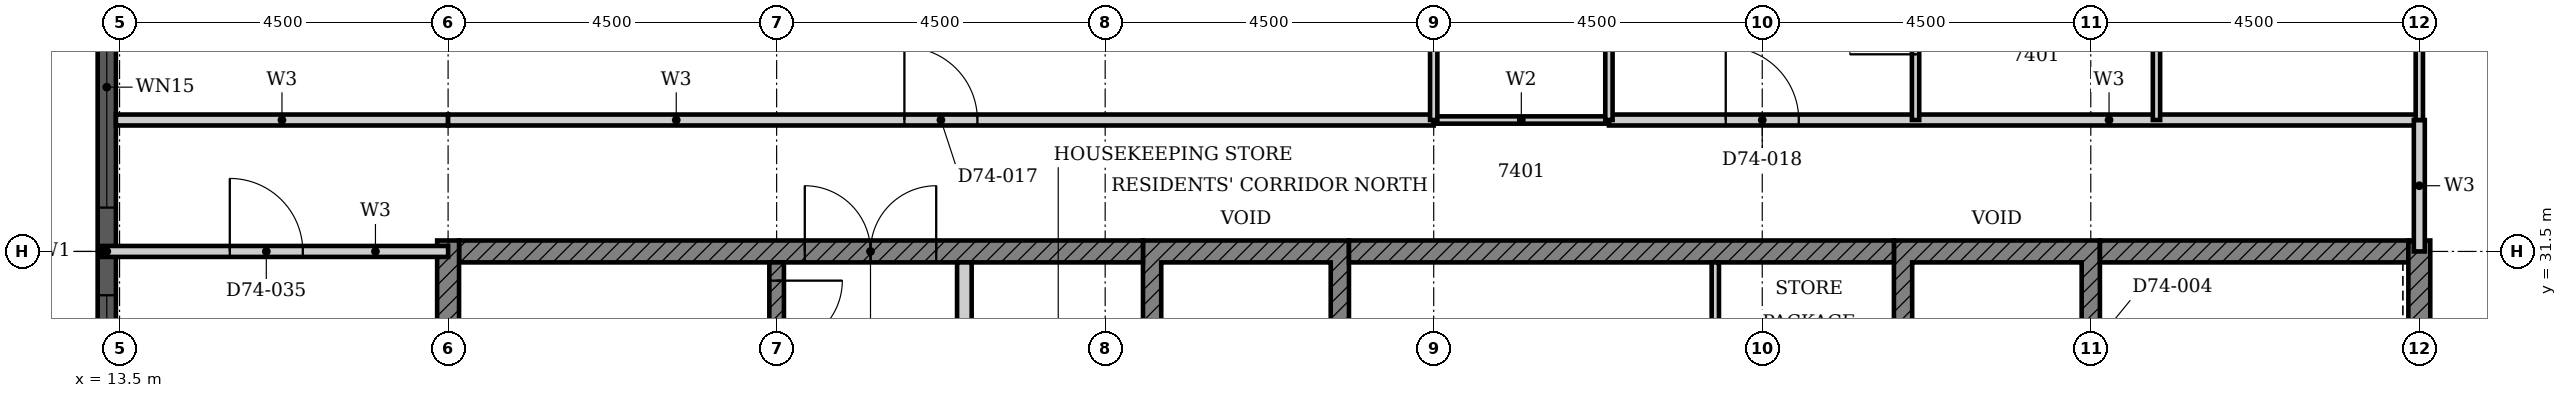
"""IFC4 building model, lengths in metres.
Left out: names, types, materials, properties, quantities, classifications, styles, units other than length and angle.
Written with IfcOpenShell. Run it as: python <this file> out.ifc"""

import sys

from ifc_helpers import new_model, si_unit, direction, frame, frame_2d, origin, place, context, subcontext, project, spatial, polyline, rectangle, outline, extrude, element, fill, save


model = new_model("IFC4")
c1 = context("Model", 3, precision=1e-05, world=origin(), true_north=direction((0.0, 1.0)))
c2 = subcontext(c1, "Body", "Model", "MODEL_VIEW")
j1 = project(units=[si_unit("LENGTHUNIT", "METRE"), si_unit("PLANEANGLEUNIT", "RADIAN")], contexts=[c1])
p1 = place(None, origin())
s1 = spatial("IfcSite", under=j1, at=p1, CompositionType="ELEMENT")
p2 = place(p1, origin())
s2 = spatial("IfcBuilding", under=s1, at=p2, CompositionType="ELEMENT")
p3 = place(p2, frame((0.0, 0.0, 290.8)))
s3 = spatial("IfcBuildingStorey", under=s2, at=p3, CompositionType="ELEMENT", Elevation=290.8)
p4 = place(p3, frame((13.325, 35.7, 0.0), z_axis=(0.0, 0.0, 1.0), x_axis=(0.0, -1.0, 0.0)))
e1 = element("IfcWall", 1, at=p4, inside=s3, PredefinedType="SOLIDWALL", context=c2, shape_type="SweptSolid", body=[
    extrude(rectangle(XDim=8.4, YDim=0.25, at=frame_2d((4.2, 0.0))), origin(), (0.0, 0.0, 1.0), 3.7),
])
p5 = place(p4, frame((0.3, 0.0, 0.45)))
e2 = element("IfcOpeningElement", 2, at=p5, cuts=e1, PredefinedType="OPENING", context=c2, shape_type="SweptSolid", body=[
    extrude(rectangle(XDim=3.3, YDim=2.3, at=frame_2d((1.65, 1.15))), frame((0.0, 0.135, 0.0), z_axis=(0.0, -1.0, 0.0), x_axis=(1.0, 0.0, 0.0)), (0.0, 0.0, 1.0), 0.27),
])
p6 = place(p4, frame((4.8, 0.0, 0.45)))
e3 = element("IfcOpeningElement", 3, at=p6, cuts=e1, PredefinedType="OPENING", context=c2, shape_type="SweptSolid", body=[
    extrude(rectangle(XDim=3.3, YDim=2.3, at=frame_2d((1.65, 1.15))), frame((0.0, 0.135, 0.0), z_axis=(0.0, -1.0, 0.0), x_axis=(1.0, 0.0, 0.0)), (0.0, 0.0, 1.0), 0.27),
])
p7 = place(p3, origin())
e4 = element("IfcWall", 4, at=p7, inside=s3, PredefinedType="SHEAR", context=c2, shape_type="SweptSolid", body=[
    extrude(outline(polyline([(27.518, 28.725), (27.768, 28.725), (27.768, 31.35), (30.089, 31.35), (30.089, 28.725), (30.339, 28.725), (30.339, 31.65), (27.518, 31.65), (27.518, 28.725)])), origin(), (0.0, 0.0, 1.0), 3.4),
])
p8 = place(p3, origin())
e5 = element("IfcWall", 5, at=p8, inside=s3, PredefinedType="SHEAR", context=c2, shape_type="SweptSolid", body=[
    extrude(outline(polyline([(37.803, 28.725), (38.053, 28.725), (38.053, 31.35), (40.375, 31.35), (40.375, 28.725), (40.625, 28.725), (40.625, 31.65), (37.803, 31.65), (37.803, 28.725)])), origin(), (0.0, 0.0, 1.0), 3.4),
])
p9 = place(p3, frame((18.15, 31.5, 0.0), z_axis=(0.0, 0.0, 1.0), x_axis=(1.0, 0.0, 0.0)))
e6 = element("IfcWall", 6, at=p9, inside=s3, PredefinedType="SHEAR", context=c2, shape_type="SweptSolid", body=[
    extrude(rectangle(XDim=9.368, YDim=0.3, at=frame_2d((4.684, 0.0))), origin(), (0.0, 0.0, 1.0), 3.4),
])
p10 = place(p9, frame((4.736, 0.0, 0.0)))
e7 = element("IfcOpeningElement", 7, at=p10, cuts=e6, PredefinedType="OPENING", context=c2, shape_type="SweptSolid", body=[
    extrude(rectangle(XDim=1.8, YDim=2.1, at=frame_2d((0.9, 1.05))), frame((0.0, 0.16, 0.0), z_axis=(0.0, -1.0, 0.0), x_axis=(1.0, 0.0, 0.0)), (0.0, 0.0, 1.0), 0.32),
])
p11 = place(p3, frame((30.339, 31.5, 0.0), z_axis=(0.0, 0.0, 1.0), x_axis=(1.0, 0.0, 0.0)))
e8 = element("IfcWall", 8, at=p11, inside=s3, PredefinedType="SHEAR", context=c2, shape_type="SweptSolid", body=[
    extrude(rectangle(XDim=7.464, YDim=0.3, at=frame_2d((3.732, 0.0))), origin(), (0.0, 0.0, 1.0), 3.4),
])
p12 = place(p3, frame((40.625, 31.5, 0.0), z_axis=(0.0, 0.0, 1.0), x_axis=(1.0, 0.0, 0.0)))
e9 = element("IfcWall", 9, at=p12, inside=s3, PredefinedType="SHEAR", context=c2, shape_type="SweptSolid", body=[
    extrude(rectangle(XDim=4.225, YDim=0.3, at=frame_2d((2.113, 0.0))), origin(), (0.0, 0.0, 1.0), 3.4),
])
for number, where, z_axis, x_axis in (
    (10, (18.0, 22.35, 0.0), (0.0, 0.0, 1.0), (0.0, 1.0, 0.0)),
    (11, (45.0, 22.35, 0.0), (0.0, 0.0, 1.0), (0.0, 1.0, 0.0)),
):
    element("IfcWall", number, at=place(p3, frame(where, z_axis=z_axis, x_axis=x_axis)), inside=s3, PredefinedType="SHEAR", context=c2, shape_type="SweptSolid", body=[
        extrude(rectangle(XDim=9.3, YDim=0.3, at=frame_2d((4.65, 0.0))), origin(), (0.0, 0.0, 1.0), 3.4),
    ])
p13 = place(p3, frame((25.072, 28.725, 0.0), z_axis=(0.0, 0.0, 1.0), x_axis=(0.0, 1.0, 0.0)))
e12 = element("IfcWall", 12, at=p13, inside=s3, PredefinedType="PARTITIONING", context=c2, shape_type="SweptSolid", body=[
    extrude(rectangle(XDim=2.625, YDim=0.2, at=frame_2d((1.312, 0.0))), origin(), (0.0, 0.0, 1.0), 3.4),
])
p14 = place(p3, frame((35.357, 28.725, 0.0), z_axis=(0.0, 0.0, 1.0), x_axis=(0.0, 1.0, 0.0)))
e13 = element("IfcWall", 13, at=p14, inside=s3, PredefinedType="PARTITIONING", context=c2, shape_type="SweptSolid", body=[
    extrude(rectangle(XDim=2.625, YDim=0.1, at=frame_2d((1.312, 0.0))), origin(), (0.0, 0.0, 1.0), 3.4),
])
p15 = place(p3, frame((22.5, 31.35, 0.0), z_axis=(0.0, 0.0, 1.0), x_axis=(0.0, -1.0, 0.0)))
e14 = element("IfcWall", 14, at=p15, inside=s3, PredefinedType="SHEAR", context=c2, shape_type="SweptSolid", body=[
    extrude(rectangle(XDim=5.825, YDim=0.2, at=frame_2d((2.913, 0.0))), origin(), (0.0, 0.0, 1.0), 3.4),
])
p16 = place(p15, frame((0.25, 0.0, 0.0)))
e15 = element("IfcOpeningElement", 15, at=p16, cuts=e14, PredefinedType="OPENING", context=c2, shape_type="SweptSolid", body=[
    extrude(rectangle(XDim=1.8, YDim=2.1, at=frame_2d((0.9, 1.05))), frame((0.0, 0.11, 0.0), z_axis=(0.0, -1.0, 0.0), x_axis=(1.0, 0.0, 0.0)), (0.0, 0.0, 1.0), 0.22),
])
p17 = place(p3, frame((13.26, 31.5, 0.0), z_axis=(0.0, 0.0, 1.0), x_axis=(1.0, 0.0, 0.0)))
e16 = element("IfcWall", 16, at=p17, inside=s3, PredefinedType="PARTITIONING", context=c2, shape_type="SweptSolid", body=[
    extrude(rectangle(XDim=4.74, YDim=0.15, at=frame_2d((2.37, 0.0))), origin(), (0.0, 0.0, 1.0), 3.4),
])
p18 = place(p17, frame((1.75, 0.0, 0.0)))
e17 = element("IfcOpeningElement", 17, at=p18, cuts=e16, PredefinedType="OPENING", context=c2, shape_type="SweptSolid", body=[
    extrude(rectangle(XDim=1.0, YDim=2.2, at=frame_2d((0.5, 1.1))), frame((0.0, 0.085, 0.0), z_axis=(0.0, -1.0, 0.0), x_axis=(1.0, 0.0, 0.0)), (0.0, 0.0, 1.0), 0.17),
])
p19 = place(p3, frame((13.45, 33.3, 0.0), z_axis=(0.0, 0.0, 1.0), x_axis=(1.0, 0.0, 0.0)))
e18 = element("IfcWall", 18, at=p19, inside=s3, PredefinedType="PARTITIONING", context=c2, shape_type="SweptSolid", body=[
    extrude(rectangle(XDim=4.549, YDim=0.15, at=frame_2d((2.274, 0.0))), origin(), (0.0, 0.0, 1.0), 3.4),
])
p20 = place(p3, frame((18.0, 33.3, 0.0), z_axis=(0.0, 0.0, 1.0), x_axis=(1.0, 0.0, 0.0)))
e19 = element("IfcWall", 19, at=p20, inside=s3, PredefinedType="PARTITIONING", context=c2, shape_type="SweptSolid", body=[
    extrude(rectangle(XDim=13.5, YDim=0.15, at=frame_2d((6.75, 0.0))), origin(), (0.0, 0.0, 1.0), 3.4),
])
p21 = place(p20, frame((6.25, 0.0, 0.0)))
e20 = element("IfcOpeningElement", 20, at=p21, cuts=e19, PredefinedType="OPENING", context=c2, shape_type="SweptSolid", body=[
    extrude(rectangle(XDim=1.0, YDim=2.1, at=frame_2d((0.5, 1.05))), frame((0.0, 0.085, 0.0), z_axis=(0.0, -1.0, 0.0), x_axis=(1.0, 0.0, 0.0)), (0.0, 0.0, 1.0), 0.17),
])
p22 = place(p3, frame((33.9, 33.3, 0.0), z_axis=(0.0, 0.0, 1.0), x_axis=(1.0, 0.0, 0.0)))
e21 = element("IfcWall", 21, at=p22, inside=s3, PredefinedType="PARTITIONING", context=c2, shape_type="SweptSolid", body=[
    extrude(rectangle(XDim=11.1, YDim=0.15, at=frame_2d((5.55, 0.0))), origin(), (0.0, 0.0, 1.0), 3.4),
])
p23 = place(p22, frame((1.6, 0.0, 0.0)))
e22 = element("IfcOpeningElement", 22, at=p23, cuts=e21, PredefinedType="OPENING", context=c2, shape_type="SweptSolid", body=[
    extrude(rectangle(XDim=1.0, YDim=2.2, at=frame_2d((0.5, 1.1))), frame((0.0, 0.085, 0.0), z_axis=(0.0, -1.0, 0.0), x_axis=(1.0, 0.0, 0.0)), (0.0, 0.0, 1.0), 0.17),
])
p24 = place(p3, frame((45.0, 31.5, 0.0), z_axis=(0.0, 0.0, 1.0), x_axis=(0.0, 1.0, 0.0)))
e23 = element("IfcWall", 23, at=p24, inside=s3, PredefinedType="PARTITIONING", context=c2, shape_type="SweptSolid", body=[
    extrude(rectangle(XDim=1.8, YDim=0.15, at=frame_2d((0.9, 0.0))), origin(), (0.0, 0.0, 1.0), 3.4),
])
p25 = place(p3, frame((38.1, 33.3, 0.0), z_axis=(0.0, 0.0, 1.0), x_axis=(0.0, 1.0, 0.0)))
e24 = element("IfcWall", 24, at=p25, inside=s3, PredefinedType="PARTITIONING", context=c2, shape_type="SweptSolid", body=[
    extrude(rectangle(XDim=2.7, YDim=0.1, at=frame_2d((1.35, 0.0))), origin(), (0.0, 0.0, 1.0), 3.4),
])
p26 = place(p25, frame((0.9, 0.0, 0.0)))
e25 = element("IfcOpeningElement", 25, at=p26, cuts=e24, PredefinedType="OPENING", context=c2, shape_type="SweptSolid", body=[
    extrude(rectangle(XDim=0.9, YDim=2.1, at=frame_2d((0.45, 1.05))), frame((0.0, 0.06, 0.0), z_axis=(0.0, -1.0, 0.0), x_axis=(1.0, 0.0, 0.0)), (0.0, 0.0, 1.0), 0.12),
])
p27 = place(p3, frame((41.4, 33.3, 0.0), z_axis=(0.0, 0.0, 1.0), x_axis=(0.0, 1.0, 0.0)))
e26 = element("IfcWall", 26, at=p27, inside=s3, PredefinedType="PARTITIONING", context=c2, shape_type="SweptSolid", body=[
    extrude(rectangle(XDim=2.7, YDim=0.1, at=frame_2d((1.35, 0.0))), origin(), (0.0, 0.0, 1.0), 3.4),
])
p28 = place(p3, frame((45.0, 33.3, 0.0), z_axis=(0.0, 0.0, 1.0), x_axis=(0.0, 1.0, 0.0)))
e27 = element("IfcWall", 27, at=p28, inside=s3, PredefinedType="PARTITIONING", context=c2, shape_type="SweptSolid", body=[
    extrude(rectangle(XDim=4.9, YDim=0.1, at=frame_2d((2.45, 0.0))), origin(), (0.0, 0.0, 1.0), 3.4),
])
p29 = place(p3, frame((31.5, 33.3, 0.0), z_axis=(0.0, 0.0, 1.0), x_axis=(1.0, 0.0, 0.0)))
e28 = element("IfcWall", 28, at=p29, inside=s3, PredefinedType="PARTITIONING", context=c2, shape_type="SweptSolid", body=[
    extrude(rectangle(XDim=2.4, YDim=0.1, at=frame_2d((1.2, 0.0))), origin(), (0.0, 0.0, 1.0), 3.4),
])
p30 = place(p3, frame((31.5, 33.3, 0.0), z_axis=(0.0, 0.0, 1.0), x_axis=(0.0, 1.0, 0.0)))
e29 = element("IfcWall", 29, at=p30, inside=s3, PredefinedType="PARTITIONING", context=c2, shape_type="SweptSolid", body=[
    extrude(rectangle(XDim=2.7, YDim=0.1, at=frame_2d((1.35, 0.0))), origin(), (0.0, 0.0, 1.0), 3.4),
])
p31 = place(p3, frame((33.9, 33.3, 0.0), z_axis=(0.0, 0.0, 1.0), x_axis=(0.0, 1.0, 0.0)))
e30 = element("IfcWall", 30, at=p31, inside=s3, PredefinedType="PARTITIONING", context=c2, shape_type="SweptSolid", body=[
    extrude(rectangle(XDim=2.7, YDim=0.1, at=frame_2d((1.35, 0.0))), origin(), (0.0, 0.0, 1.0), 3.4),
])
p32 = place(p31, frame((0.95, 0.0, 0.0)))
e31 = element("IfcOpeningElement", 31, at=p32, cuts=e30, PredefinedType="OPENING", context=c2, shape_type="SweptSolid", body=[
    extrude(rectangle(XDim=0.8, YDim=2.1, at=frame_2d((0.4, 1.05))), frame((0.0, 0.06, 0.0), z_axis=(0.0, -1.0, 0.0), x_axis=(1.0, 0.0, 0.0)), (0.0, 0.0, 1.0), 0.12),
])
p33 = place(p5, origin())
e32 = element("IfcWindow", 32, at=p33, inside=s3, PartitioningType="SINGLE_PANEL", PredefinedType="WINDOW", context=c2, shape_type="SweptSolid", body=[
    extrude(rectangle(XDim=3.3, YDim=2.3, at=frame_2d((1.65, 1.15))), frame((0.0, 0.03, 0.0), z_axis=(0.0, -1.0, 0.0), x_axis=(1.0, 0.0, 0.0)), (0.0, 0.0, 1.0), 0.06),
])
fill(e2, e32)
p34 = place(p6, origin())
e33 = element("IfcWindow", 33, at=p34, inside=s3, PartitioningType="SINGLE_PANEL", PredefinedType="WINDOW", context=c2, shape_type="SweptSolid", body=[
    extrude(rectangle(XDim=3.3, YDim=2.3, at=frame_2d((1.65, 1.15))), frame((0.0, 0.03, 0.0), z_axis=(0.0, -1.0, 0.0), x_axis=(1.0, 0.0, 0.0)), (0.0, 0.0, 1.0), 0.06),
])
fill(e3, e33)
p35 = place(p16, origin())
e34 = element("IfcDoor", 34, at=p35, inside=s3, OperationType="DOUBLE_DOOR_SINGLE_SWING", PredefinedType="DOOR", context=c2, shape_type="SweptSolid", body=[
    extrude(rectangle(XDim=1.8, YDim=2.1, at=frame_2d((0.9, 1.05))), frame((0.0, 0.025, 0.0), z_axis=(0.0, -1.0, 0.0), x_axis=(1.0, 0.0, 0.0)), (0.0, 0.0, 1.0), 0.05),
])
fill(e15, e34)
p36 = place(p10, origin())
e35 = element("IfcDoor", 35, at=p36, inside=s3, OperationType="DOUBLE_DOOR_SINGLE_SWING", PredefinedType="DOOR", context=c2, shape_type="SweptSolid", body=[
    extrude(rectangle(XDim=1.8, YDim=2.1, at=frame_2d((0.9, 1.05))), frame((0.0, 0.025, 0.0), z_axis=(0.0, -1.0, 0.0), x_axis=(1.0, 0.0, 0.0)), (0.0, 0.0, 1.0), 0.05),
])
fill(e7, e35)
p37 = place(p21, origin())
e36 = element("IfcDoor", 36, at=p37, inside=s3, OperationType="SINGLE_SWING_LEFT", PredefinedType="DOOR", context=c2, shape_type="SweptSolid", body=[
    extrude(rectangle(XDim=1.0, YDim=2.1, at=frame_2d((0.5, 1.05))), frame((0.0, 0.025, 0.0), z_axis=(0.0, -1.0, 0.0), x_axis=(1.0, 0.0, 0.0)), (0.0, 0.0, 1.0), 0.05),
])
fill(e20, e36)
p38 = place(p23, origin())
e37 = element("IfcDoor", 37, at=p38, inside=s3, OperationType="SINGLE_SWING_RIGHT", PredefinedType="DOOR", context=c2, shape_type="SweptSolid", body=[
    extrude(rectangle(XDim=1.0, YDim=2.2, at=frame_2d((0.5, 1.1))), frame((0.0, 0.025, 0.0), z_axis=(0.0, -1.0, 0.0), x_axis=(1.0, 0.0, 0.0)), (0.0, 0.0, 1.0), 0.05),
])
fill(e22, e37)
p39 = place(p26, origin())
e38 = element("IfcDoor", 38, at=p39, inside=s3, OperationType="SINGLE_SWING_RIGHT", PredefinedType="DOOR", context=c2, shape_type="SweptSolid", body=[
    extrude(rectangle(XDim=0.9, YDim=2.1, at=frame_2d((0.45, 1.05))), frame((0.0, 0.025, 0.0), z_axis=(0.0, -1.0, 0.0), x_axis=(1.0, 0.0, 0.0)), (0.0, 0.0, 1.0), 0.05),
])
fill(e25, e38)
p40 = place(p18, origin())
e39 = element("IfcDoor", 39, at=p40, inside=s3, OperationType="SINGLE_SWING_RIGHT", PredefinedType="DOOR", context=c2, shape_type="SweptSolid", body=[
    extrude(rectangle(XDim=1.0, YDim=2.2, at=frame_2d((0.5, 1.1))), frame((0.0, 0.025, 0.0), z_axis=(0.0, -1.0, 0.0), x_axis=(1.0, 0.0, 0.0)), (0.0, 0.0, 1.0), 0.05),
])
fill(e17, e39)
save(model, sys.argv[1])
